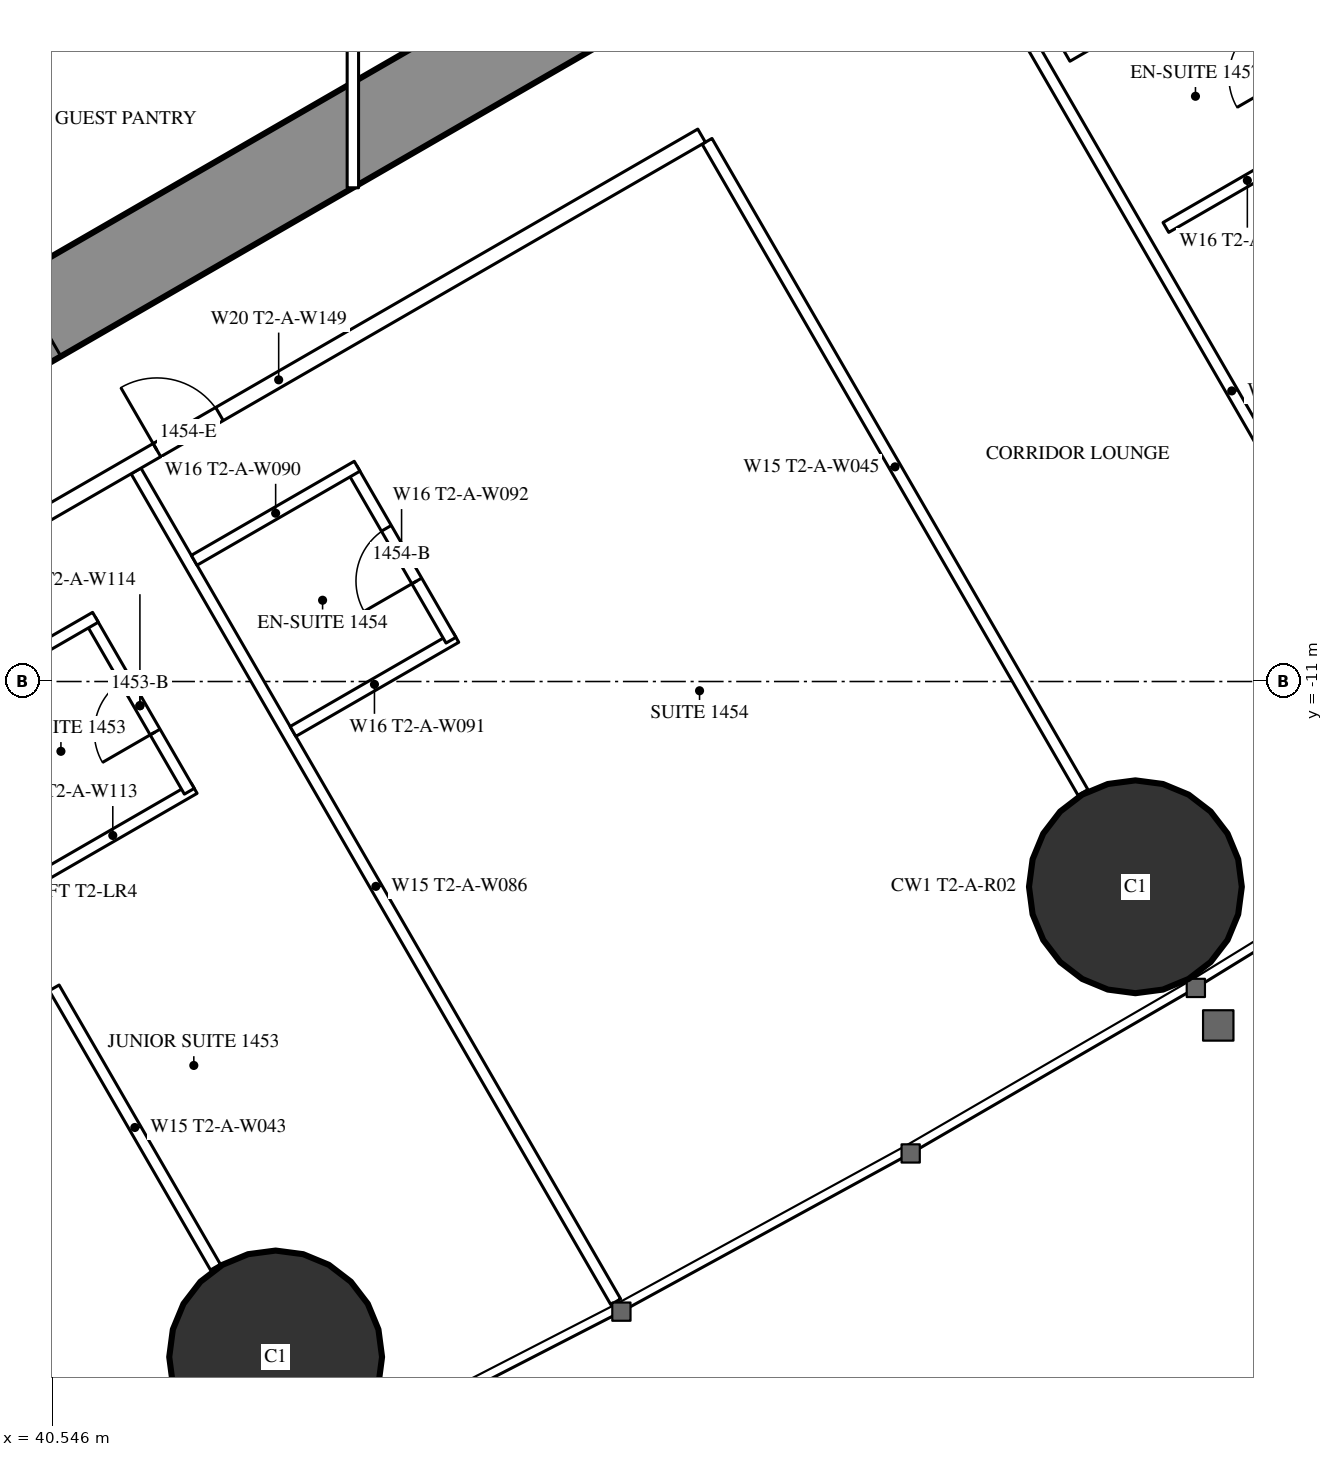
"""IFC4 building model, lengths in metres.
Left out: names, types, materials, properties, quantities, classifications, styles, units other than length and angle.
Written with IfcOpenShell. Run it as: python <this file> out.ifc"""

import sys

from ifc_helpers import new_model, si_unit, direction, frame, frame_2d, origin, origin_2d, place, context, subcontext, project, spatial, rectangle, hollow_circle, extrude, element, fill, save


model = new_model("IFC4")
c1 = context("Model", 3, precision=1e-05, world=origin(), true_north=direction((0.0, 1.0)))
c2 = subcontext(c1, "Body", "Model", "MODEL_VIEW")
j1 = project(units=[si_unit("LENGTHUNIT", "METRE"), si_unit("PLANEANGLEUNIT", "RADIAN")], contexts=[c1])
p1 = place(None, origin())
s1 = spatial("IfcSite", under=j1, at=p1, CompositionType="ELEMENT")
p2 = place(p1, origin())
s2 = spatial("IfcBuilding", under=s1, at=p2, CompositionType="ELEMENT")
p3 = place(p2, frame((0.0, 0.0, 56.5)))
s3 = spatial("IfcBuildingStorey", under=s2, at=p3, CompositionType="ELEMENT", Elevation=56.5)
for number, where, z_axis, x_axis in (
    (1, (43.484, -19.886, 0.0), (0.0, 0.0, 1.0), (1.0, 0.0, 0.0)),
    (2, (54.795, -13.701, 0.0), (0.0, 0.0, 1.0), (1.0, 0.0, 0.0)),
):
    element("IfcColumn", number, at=place(p3, frame(where, z_axis=z_axis, x_axis=x_axis)), inside=s3, PredefinedType="COLUMN", context=c2, shape_type="SweptSolid", body=[
        extrude(hollow_circle(Radius=1.4, WallThickness=0.12, at=origin_2d()), origin(), (0.0, 0.0, 1.0), 3.5),
    ])
p4 = place(p3, frame((27.2, -13.8, 0.0), z_axis=(0.0, 0.0, 1.0), x_axis=(0.866027159892, 0.499996958321, 0.0)))
e3 = element("IfcWall", 3, at=p4, inside=s3, PredefinedType="SHEAR", context=c2, shape_type="SweptSolid", body=[
    extrude(rectangle(XDim=27.947, YDim=1.2, at=frame_2d((13.973, 0.0))), origin(), (0.0, 0.0, 1.0), 3.5),
])
p5 = place(p4, frame((4.6, 0.0, 0.0)))
e4 = element("IfcOpeningElement", 4, at=p5, cuts=e3, PredefinedType="OPENING", context=c2, shape_type="SweptSolid", body=[
    extrude(rectangle(XDim=1.0, YDim=2.2, at=frame_2d((0.5, 1.1))), frame((0.0, 0.61, 0.0), z_axis=(0.0, -1.0, 0.0), x_axis=(1.0, 0.0, 0.0)), (0.0, 0.0, 1.0), 1.22),
])
p6 = place(p4, frame((13.395, 0.0, 0.0)))
e5 = element("IfcOpeningElement", 5, at=p6, cuts=e3, PredefinedType="OPENING", context=c2, shape_type="SweptSolid", body=[
    extrude(rectangle(XDim=1.8, YDim=2.2, at=frame_2d((0.9, 1.1))), frame((0.0, 0.61, 0.0), z_axis=(0.0, -1.0, 0.0), x_axis=(1.0, 0.0, 0.0)), (0.0, 0.0, 1.0), 1.22),
])
p7 = place(p3, frame((41.647, -8.23, 0.0), z_axis=(0.0, 0.0, 1.0), x_axis=(0.49998590462, -0.866033541603, 0.0)))
e6 = element("IfcWall", 6, at=p7, inside=s3, PredefinedType="PARTITIONING", context=c2, shape_type="SweptSolid", body=[
    extrude(rectangle(XDim=12.621, YDim=0.15, at=frame_2d((6.311, 0.0))), origin(), (0.0, 0.0, 1.0), 3.25),
])
p8 = place(p3, frame((49.159, -3.893, 0.0), z_axis=(0.0, 0.0, 1.0), x_axis=(0.499998773722, -0.866026111775, 0.0)))
e7 = element("IfcWall", 7, at=p8, inside=s3, PredefinedType="PARTITIONING", context=c2, shape_type="SweptSolid", body=[
    extrude(rectangle(XDim=9.892, YDim=0.15, at=frame_2d((4.946, 0.0))), origin(), (0.0, 0.0, 1.0), 2.25),
])
p9 = place(p3, frame((52.915, -1.725, 0.0), z_axis=(0.0, 0.0, 1.0), x_axis=(0.499997163113, -0.866027041656, 0.0)))
e8 = element("IfcWall", 8, at=p9, inside=s3, PredefinedType="PARTITIONING", context=c2, shape_type="SweptSolid", body=[
    extrude(rectangle(XDim=12.591, YDim=0.15, at=frame_2d((6.295, 0.0))), origin(), (0.0, 0.0, 1.0), 3.25),
])
p10 = place(p3, frame((40.57, -15.03, 0.0), z_axis=(0.0, 0.0, 1.0), x_axis=(0.500012993597, -0.866017901798, 0.0)))
e9 = element("IfcWall", 9, at=p10, inside=s3, PredefinedType="PARTITIONING", context=c2, shape_type="SweptSolid", body=[
    extrude(rectangle(XDim=4.243, YDim=0.15, at=frame_2d((2.122, 0.0))), origin(), (0.0, 0.0, 1.0), 3.25),
])
p11 = place(p3, frame((37.96, -10.243, 0.0), z_axis=(0.0, 0.0, 1.0), x_axis=(0.866030548046, 0.499991089772, 0.0)))
e10 = element("IfcWall", 10, at=p11, inside=s3, PredefinedType="PARTITIONING", context=c2, shape_type="SweptSolid", body=[
    extrude(rectangle(XDim=12.849, YDim=0.2, at=frame_2d((6.425, 0.0))), origin(), (0.0, 0.0, 1.0), 3.25),
])
p12 = place(p11, frame((4.575, 0.0, 0.0)))
e11 = element("IfcOpeningElement", 11, at=p12, cuts=e10, PredefinedType="OPENING", context=c2, shape_type="SweptSolid", body=[
    extrude(rectangle(XDim=0.95, YDim=2.2, at=frame_2d((0.475, 1.1))), frame((0.0, 0.11, 0.0), z_axis=(0.0, -1.0, 0.0), x_axis=(1.0, 0.0, 0.0)), (0.0, 0.0, 1.0), 0.22),
])
p13 = place(p11, frame((0.6, 0.0, 0.0)))
e12 = element("IfcOpeningElement", 12, at=p13, cuts=e10, PredefinedType="OPENING", context=c2, shape_type="SweptSolid", body=[
    extrude(rectangle(XDim=0.95, YDim=2.2, at=frame_2d((0.475, 1.1))), frame((0.0, 0.11, 0.0), z_axis=(0.0, -1.0, 0.0), x_axis=(1.0, 0.0, 0.0)), (0.0, 0.0, 1.0), 0.22),
])
p14 = place(p3, frame((43.712, -11.657, 0.0), z_axis=(0.0, 0.0, 1.0), x_axis=(0.866006523861, 0.500032699561, 0.0)))
e13 = element("IfcWall", 13, at=p14, inside=s3, PredefinedType="PARTITIONING", context=c2, shape_type="SweptSolid", body=[
    extrude(rectangle(XDim=2.475, YDim=0.15, at=frame_2d((1.237, 0.0))), origin(), (0.0, 0.0, 1.0), 3.25),
])
p15 = place(p3, frame((44.491, -8.205, 0.0), z_axis=(0.0, 0.0, 1.0), x_axis=(0.500047596559, -0.865997922154, 0.0)))
e14 = element("IfcWall", 14, at=p15, inside=s3, PredefinedType="PARTITIONING", context=c2, shape_type="SweptSolid", body=[
    extrude(rectangle(XDim=2.6, YDim=0.15, at=frame_2d((1.3, 0.0))), origin(), (0.0, 0.0, 1.0), 3.25),
])
p16 = place(p15, frame((0.9, 0.0, 0.0)))
e15 = element("IfcOpeningElement", 15, at=p16, cuts=e14, PredefinedType="OPENING", context=c2, shape_type="SweptSolid", body=[
    extrude(rectangle(XDim=0.8, YDim=2.2, at=frame_2d((0.4, 1.1))), frame((0.0, 0.085, 0.0), z_axis=(0.0, -1.0, 0.0), x_axis=(1.0, 0.0, 0.0)), (0.0, 0.0, 1.0), 0.17),
])
p17 = place(p3, frame((42.412, -9.405, 0.0), z_axis=(0.0, 0.0, 1.0), x_axis=(0.866006523861, 0.500032699561, 0.0)))
e16 = element("IfcWall", 16, at=p17, inside=s3, PredefinedType="PARTITIONING", context=c2, shape_type="SweptSolid", body=[
    extrude(rectangle(XDim=2.475, YDim=0.15, at=frame_2d((1.237, 0.0))), origin(), (0.0, 0.0, 1.0), 3.25),
])
p18 = place(p3, frame((55.196, -5.026, 0.0), z_axis=(0.0, 0.0, 1.0), x_axis=(0.866073894602, 0.499916002032, 0.0)))
e17 = element("IfcWall", 17, at=p18, inside=s3, PredefinedType="PARTITIONING", context=c2, shape_type="SweptSolid", body=[
    extrude(rectangle(XDim=2.475, YDim=0.15, at=frame_2d((1.238, 0.0))), origin(), (0.0, 0.0, 1.0), 3.25),
])
p19 = place(p3, frame((55.975, -1.575, 0.0), z_axis=(0.0, 0.0, 1.0), x_axis=(0.500006934395, -0.866021400173, 0.0)))
e18 = element("IfcWall", 18, at=p19, inside=s3, PredefinedType="PARTITIONING", context=c2, shape_type="SweptSolid", body=[
    extrude(rectangle(XDim=2.6, YDim=0.15, at=frame_2d((1.3, 0.0))), origin(), (0.0, 0.0, 1.0), 3.25),
])
p20 = place(p19, frame((0.9, 0.0, 0.0)))
e19 = element("IfcOpeningElement", 19, at=p20, cuts=e18, PredefinedType="OPENING", context=c2, shape_type="SweptSolid", body=[
    extrude(rectangle(XDim=0.8, YDim=2.2, at=frame_2d((0.4, 1.1))), frame((0.0, 0.085, 0.0), z_axis=(0.0, -1.0, 0.0), x_axis=(1.0, 0.0, 0.0)), (0.0, 0.0, 1.0), 0.17),
])
p21 = place(p3, frame((53.896, -2.775, 0.0), z_axis=(0.0, 0.0, 1.0), x_axis=(0.866006523861, 0.500032699561, 0.0)))
e20 = element("IfcWall", 20, at=p21, inside=s3, PredefinedType="PARTITIONING", context=c2, shape_type="SweptSolid", body=[
    extrude(rectangle(XDim=2.475, YDim=0.15, at=frame_2d((1.237, 0.0))), origin(), (0.0, 0.0, 1.0), 3.25),
])
p22 = place(p3, frame((40.27, -13.644, 0.0), z_axis=(0.0, 0.0, 1.0), x_axis=(0.866031185235, 0.4999899861, 0.0)))
e21 = element("IfcWall", 21, at=p22, inside=s3, PredefinedType="PARTITIONING", context=c2, shape_type="SweptSolid", body=[
    extrude(rectangle(XDim=2.475, YDim=0.15, at=frame_2d((1.238, 0.0))), origin(), (0.0, 0.0, 1.0), 3.25),
])
p23 = place(p3, frame((41.048, -10.193, 0.0), z_axis=(0.0, 0.0, 1.0), x_axis=(0.500047596559, -0.865997922154, 0.0)))
e22 = element("IfcWall", 22, at=p23, inside=s3, PredefinedType="PARTITIONING", context=c2, shape_type="SweptSolid", body=[
    extrude(rectangle(XDim=2.6, YDim=0.15, at=frame_2d((1.3, 0.0))), origin(), (0.0, 0.0, 1.0), 3.25),
])
p24 = place(p23, frame((0.9, 0.0, 0.0)))
e23 = element("IfcOpeningElement", 23, at=p24, cuts=e22, PredefinedType="OPENING", context=c2, shape_type="SweptSolid", body=[
    extrude(rectangle(XDim=0.8, YDim=2.2, at=frame_2d((0.4, 1.1))), frame((0.0, 0.085, 0.0), z_axis=(0.0, -1.0, 0.0), x_axis=(1.0, 0.0, 0.0)), (0.0, 0.0, 1.0), 0.17),
])
p25 = place(p3, frame((38.97, -11.393, 0.0), z_axis=(0.0, 0.0, 1.0), x_axis=(0.866031185235, 0.4999899861, 0.0)))
e24 = element("IfcWall", 24, at=p25, inside=s3, PredefinedType="PARTITIONING", context=c2, shape_type="SweptSolid", body=[
    extrude(rectangle(XDim=2.475, YDim=0.15, at=frame_2d((1.238, 0.0))), origin(), (0.0, 0.0, 1.0), 3.25),
])
p26 = place(p3, frame((44.5, -4.505, 0.0), z_axis=(0.0, 0.0, 1.0), x_axis=(0.0, 1.0, 0.0)))
e25 = element("IfcWall", 25, at=p26, inside=s3, PredefinedType="PARTITIONING", context=c2, shape_type="SweptSolid", body=[
    extrude(rectangle(XDim=9.009, YDim=0.15, at=frame_2d((4.505, 0.0))), origin(), (0.0, 0.0, 1.0), 2.45),
])
p27 = place(p26, frame((4.005, 0.0, 0.0)))
e26 = element("IfcOpeningElement", 26, at=p27, cuts=e25, PredefinedType="OPENING", context=c2, shape_type="SweptSolid", body=[
    extrude(rectangle(XDim=1.0, YDim=2.2, at=frame_2d((0.5, 1.1))), frame((0.0, 0.085, 0.0), z_axis=(0.0, -1.0, 0.0), x_axis=(1.0, 0.0, 0.0)), (0.0, 0.0, 1.0), 0.17),
])
p28 = place(p16, origin())
e27 = element("IfcDoor", 27, at=p28, inside=s3, OperationType="SINGLE_SWING_RIGHT", PredefinedType="DOOR", context=c2, shape_type="SweptSolid", body=[
    extrude(rectangle(XDim=0.8, YDim=2.2, at=frame_2d((0.4, 1.1))), frame((0.0, 0.025, 0.0), z_axis=(0.0, -1.0, 0.0), x_axis=(1.0, 0.0, 0.0)), (0.0, 0.0, 1.0), 0.05),
])
fill(e15, e27)
p29 = place(p12, origin())
e28 = element("IfcDoor", 28, at=p29, inside=s3, OperationType="SINGLE_SWING_LEFT", PredefinedType="DOOR", context=c2, shape_type="SweptSolid", body=[
    extrude(rectangle(XDim=0.95, YDim=2.2, at=frame_2d((0.475, 1.1))), frame((0.0, 0.025, 0.0), z_axis=(0.0, -1.0, 0.0), x_axis=(1.0, 0.0, 0.0)), (0.0, 0.0, 1.0), 0.05),
])
fill(e11, e28)
p30 = place(p24, origin())
e29 = element("IfcDoor", 29, at=p30, inside=s3, OperationType="SINGLE_SWING_RIGHT", PredefinedType="DOOR", context=c2, shape_type="SweptSolid", body=[
    extrude(rectangle(XDim=0.8, YDim=2.2, at=frame_2d((0.4, 1.1))), frame((0.0, 0.025, 0.0), z_axis=(0.0, -1.0, 0.0), x_axis=(1.0, 0.0, 0.0)), (0.0, 0.0, 1.0), 0.05),
])
fill(e23, e29)
save(model, sys.argv[1])
